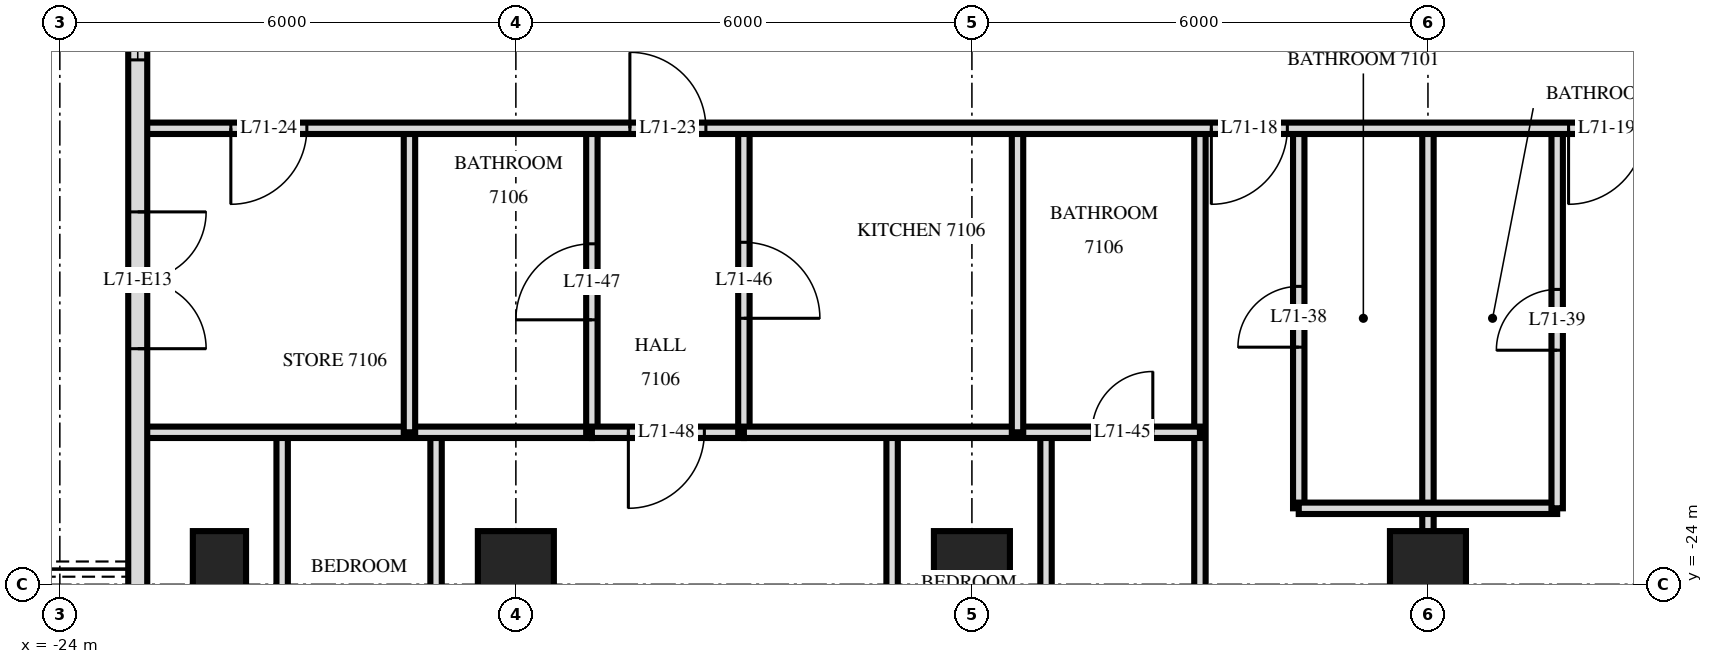
"""IFC4 building model, lengths in metres.
Left out: names, types, materials, properties, quantities, classifications, styles, units other than length and angle.
Written with IfcOpenShell. Run it as: python <this file> out.ifc"""

import sys

from ifc_helpers import new_model, si_unit, direction, frame, frame_2d, origin, origin_2d, place, context, subcontext, project, spatial, rectangle, extrude, element, fill, save


model = new_model("IFC4")
c1 = context("Model", 3, precision=1e-05, world=origin(), true_north=direction((0.0, 1.0)))
c2 = subcontext(c1, "Body", "Model", "MODEL_VIEW")
j1 = project(units=[si_unit("LENGTHUNIT", "METRE"), si_unit("PLANEANGLEUNIT", "RADIAN")], contexts=[c1])
p1 = place(None, origin())
s1 = spatial("IfcSite", under=j1, at=p1, CompositionType="ELEMENT")
p2 = place(p1, origin())
s2 = spatial("IfcBuilding", under=s1, at=p2, CompositionType="ELEMENT")
p3 = place(p2, frame((0.0, 0.0, 270.1)))
s3 = spatial("IfcBuildingStorey", under=s2, at=p3, CompositionType="ELEMENT", Elevation=270.1)
p4 = place(p3, frame((-21.9, -23.8, 0.0), z_axis=(0.0, 0.0, 1.0), x_axis=(0.0, 1.0, 0.0)))
e1 = element("IfcColumn", 1, at=p4, inside=s3, PredefinedType="COLUMN", context=c2, shape_type="SweptSolid", body=[
    extrude(rectangle(XDim=1.0, YDim=0.7, at=origin_2d()), origin(), (0.0, 0.0, 1.0), 3.5),
])
for number, where, z_axis, x_axis in (
    (2, (-18.0, -23.8, 0.0), (0.0, 0.0, 1.0), (1.0, 0.0, 0.0)),
    (3, (-12.0, -23.8, 0.0), (0.0, 0.0, 1.0), (1.0, 0.0, 0.0)),
    (4, (-6.0, -23.8, 0.0), (0.0, 0.0, 1.0), (1.0, 0.0, 0.0)),
):
    element("IfcColumn", number, at=place(p3, frame(where, z_axis=z_axis, x_axis=x_axis)), inside=s3, PredefinedType="COLUMN", context=c2, shape_type="SweptSolid", body=[
        extrude(rectangle(XDim=1.0, YDim=1.0, at=origin_2d()), origin(), (0.0, 0.0, 1.0), 3.5),
    ])
p5 = place(p3, frame((-22.975, -3.325, 0.0), z_axis=(0.0, 0.0, 1.0), x_axis=(0.0, -1.0, 0.0)))
e5 = element("IfcWall", 5, at=p5, inside=s3, PredefinedType="SOLIDWALL", context=c2, shape_type="SweptSolid", body=[
    extrude(rectangle(XDim=25.951, YDim=0.25, at=frame_2d((12.975, 0.0))), origin(), (0.0, 0.0, 1.0), 3.22),
])
p6 = place(p5, frame((1.925, 0.0, 0.0)))
e6 = element("IfcOpeningElement", 6, at=p6, cuts=e5, PredefinedType="OPENING", context=c2, shape_type="SweptSolid", body=[
    extrude(rectangle(XDim=1.8, YDim=2.4, at=frame_2d((0.9, 1.2))), frame((0.0, 0.135, 0.0), z_axis=(0.0, -1.0, 0.0), x_axis=(1.0, 0.0, 0.0)), (0.0, 0.0, 1.0), 0.27),
])
p7 = place(p5, frame((7.975, 0.0, 0.0)))
e7 = element("IfcOpeningElement", 7, at=p7, cuts=e5, PredefinedType="OPENING", context=c2, shape_type="SweptSolid", body=[
    extrude(rectangle(XDim=1.8, YDim=2.4, at=frame_2d((0.9, 1.2))), frame((0.0, 0.135, 0.0), z_axis=(0.0, -1.0, 0.0), x_axis=(1.0, 0.0, 0.0)), (0.0, 0.0, 1.0), 0.27),
])
p8 = place(p5, frame((12.575, 0.0, 0.9)))
e8 = element("IfcOpeningElement", 8, at=p8, cuts=e5, PredefinedType="OPENING", context=c2, shape_type="SweptSolid", body=[
    extrude(rectangle(XDim=1.2, YDim=1.5, at=frame_2d((0.6, 0.75))), frame((0.0, 0.135, 0.0), z_axis=(0.0, -1.0, 0.0), x_axis=(1.0, 0.0, 0.0)), (0.0, 0.0, 1.0), 0.27),
])
p9 = place(p5, frame((15.775, 0.0, 0.0)))
e9 = element("IfcOpeningElement", 9, at=p9, cuts=e5, PredefinedType="OPENING", context=c2, shape_type="SweptSolid", body=[
    extrude(rectangle(XDim=1.8, YDim=2.4, at=frame_2d((0.9, 1.2))), frame((0.0, 0.135, 0.0), z_axis=(0.0, -1.0, 0.0), x_axis=(1.0, 0.0, 0.0)), (0.0, 0.0, 1.0), 0.27),
])
p10 = place(p5, frame((21.075, 0.0, 0.0)))
e10 = element("IfcOpeningElement", 10, at=p10, cuts=e5, PredefinedType="OPENING", context=c2, shape_type="SweptSolid", body=[
    extrude(rectangle(XDim=1.8, YDim=2.4, at=frame_2d((0.9, 1.2))), frame((0.0, 0.135, 0.0), z_axis=(0.0, -1.0, 0.0), x_axis=(1.0, 0.0, 0.0)), (0.0, 0.0, 1.0), 0.27),
])
p11 = place(p5, frame((23.825, 0.0, 0.9)))
e11 = element("IfcOpeningElement", 11, at=p11, cuts=e5, PredefinedType="OPENING", context=c2, shape_type="SweptSolid", body=[
    extrude(rectangle(XDim=1.8, YDim=1.5, at=frame_2d((0.9, 0.75))), frame((0.0, 0.135, 0.0), z_axis=(0.0, -1.0, 0.0), x_axis=(1.0, 0.0, 0.0)), (0.0, 0.0, 1.0), 0.27),
])
p12 = place(p3, frame((-4.3, -23.0, 0.0), z_axis=(0.0, 0.0, 1.0), x_axis=(0.0, 1.0, 0.0)))
e12 = element("IfcWall", 12, at=p12, inside=s3, PredefinedType="PARTITIONING", context=c2, shape_type="SweptSolid", body=[
    extrude(rectangle(XDim=5.0, YDim=0.15, at=frame_2d((2.5, 0.0))), origin(), (0.0, 0.0, 1.0), 3.22),
])
p13 = place(p12, frame((2.08, 0.0, 0.0)))
e13 = element("IfcOpeningElement", 13, at=p13, cuts=e12, PredefinedType="OPENING", context=c2, shape_type="SweptSolid", body=[
    extrude(rectangle(XDim=0.8, YDim=2.1, at=frame_2d((0.4, 1.05))), frame((0.0, 0.085, 0.0), z_axis=(0.0, -1.0, 0.0), x_axis=(1.0, 0.0, 0.0)), (0.0, 0.0, 1.0), 0.17),
])
p14 = place(p3, frame((-6.0, -33.62, 0.0), z_axis=(0.0, 0.0, 1.0), x_axis=(0.0, 1.0, 0.0)))
e14 = element("IfcWall", 14, at=p14, inside=s3, PredefinedType="PARTITIONING", context=c2, shape_type="SweptSolid", body=[
    extrude(rectangle(XDim=15.62, YDim=0.15, at=frame_2d((7.81, 0.0))), origin(), (0.0, 0.0, 1.0), 3.22),
])
p15 = place(p3, frame((-7.7, -23.0, 0.0), z_axis=(0.0, 0.0, 1.0), x_axis=(0.0, 1.0, 0.0)))
e15 = element("IfcWall", 15, at=p15, inside=s3, PredefinedType="PARTITIONING", context=c2, shape_type="SweptSolid", body=[
    extrude(rectangle(XDim=5.0, YDim=0.15, at=frame_2d((2.5, 0.0))), origin(), (0.0, 0.0, 1.0), 3.22),
])
p16 = place(p15, frame((2.12, 0.0, 0.0)))
e16 = element("IfcOpeningElement", 16, at=p16, cuts=e15, PredefinedType="OPENING", context=c2, shape_type="SweptSolid", body=[
    extrude(rectangle(XDim=0.8, YDim=2.1, at=frame_2d((0.4, 1.05))), frame((0.0, 0.085, 0.0), z_axis=(0.0, -1.0, 0.0), x_axis=(1.0, 0.0, 0.0)), (0.0, 0.0, 1.0), 0.17),
])
p17 = place(p3, frame((-9.0, -33.62, 0.0), z_axis=(0.0, 0.0, 1.0), x_axis=(0.0, 1.0, 0.0)))
e17 = element("IfcWall", 17, at=p17, inside=s3, PredefinedType="PARTITIONING", context=c2, shape_type="SweptSolid", body=[
    extrude(rectangle(XDim=15.62, YDim=0.15, at=frame_2d((7.81, 0.0))), origin(), (0.0, 0.0, 1.0), 3.22),
])
p18 = place(p3, frame((-11.025, -33.62, 0.0), z_axis=(0.0, 0.0, 1.0), x_axis=(0.0, 1.0, 0.0)))
e18 = element("IfcWall", 18, at=p18, inside=s3, PredefinedType="PARTITIONING", context=c2, shape_type="SweptSolid", body=[
    extrude(rectangle(XDim=11.62, YDim=0.15, at=frame_2d((5.81, 0.0))), origin(), (0.0, 0.0, 1.0), 3.22),
])
p19 = place(p18, frame((5.25, 0.0, 0.0)))
e19 = element("IfcOpeningElement", 19, at=p19, cuts=e18, PredefinedType="OPENING", context=c2, shape_type="SweptSolid", body=[
    extrude(rectangle(XDim=0.9, YDim=2.1, at=frame_2d((0.45, 1.05))), frame((0.0, 0.085, 0.0), z_axis=(0.0, -1.0, 0.0), x_axis=(1.0, 0.0, 0.0)), (0.0, 0.0, 1.0), 0.17),
])
p20 = place(p3, frame((-11.4, -22.0, 0.0), z_axis=(0.0, 0.0, 1.0), x_axis=(0.0, 1.0, 0.0)))
e20 = element("IfcWall", 20, at=p20, inside=s3, PredefinedType="PARTITIONING", context=c2, shape_type="SweptSolid", body=[
    extrude(rectangle(XDim=4.0, YDim=0.15, at=frame_2d((2.0, 0.0))), origin(), (0.0, 0.0, 1.0), 3.22),
])
p21 = place(p3, frame((-13.05, -33.62, 0.0), z_axis=(0.0, 0.0, 1.0), x_axis=(0.0, 1.0, 0.0)))
e21 = element("IfcWall", 21, at=p21, inside=s3, PredefinedType="PARTITIONING", context=c2, shape_type="SweptSolid", body=[
    extrude(rectangle(XDim=11.62, YDim=0.15, at=frame_2d((5.81, 0.0))), origin(), (0.0, 0.0, 1.0), 3.22),
])
p22 = place(p21, frame((5.25, 0.0, 0.0)))
e22 = element("IfcOpeningElement", 22, at=p22, cuts=e21, PredefinedType="OPENING", context=c2, shape_type="SweptSolid", body=[
    extrude(rectangle(XDim=0.9, YDim=2.1, at=frame_2d((0.45, 1.05))), frame((0.0, 0.085, 0.0), z_axis=(0.0, -1.0, 0.0), x_axis=(1.0, 0.0, 0.0)), (0.0, 0.0, 1.0), 0.17),
])
p23 = place(p3, frame((-15.0, -22.0, 0.0), z_axis=(0.0, 0.0, 1.0), x_axis=(0.0, 1.0, 0.0)))
e23 = element("IfcWall", 23, at=p23, inside=s3, PredefinedType="PARTITIONING", context=c2, shape_type="SweptSolid", body=[
    extrude(rectangle(XDim=4.0, YDim=0.15, at=frame_2d((2.0, 0.0))), origin(), (0.0, 0.0, 1.0), 3.22),
])
p24 = place(p23, frame((1.5, 0.0, 0.0)))
e24 = element("IfcOpeningElement", 24, at=p24, cuts=e23, PredefinedType="OPENING", context=c2, shape_type="SweptSolid", body=[
    extrude(rectangle(XDim=1.0, YDim=2.1, at=frame_2d((0.5, 1.05))), frame((0.0, 0.085, 0.0), z_axis=(0.0, -1.0, 0.0), x_axis=(1.0, 0.0, 0.0)), (0.0, 0.0, 1.0), 0.17),
])
p25 = place(p3, frame((-17.0, -22.0, 0.0), z_axis=(0.0, 0.0, 1.0), x_axis=(0.0, 1.0, 0.0)))
e25 = element("IfcWall", 25, at=p25, inside=s3, PredefinedType="PARTITIONING", context=c2, shape_type="SweptSolid", body=[
    extrude(rectangle(XDim=4.0, YDim=0.15, at=frame_2d((2.0, 0.0))), origin(), (0.0, 0.0, 1.0), 3.22),
])
p26 = place(p25, frame((1.48, 0.0, 0.0)))
e26 = element("IfcOpeningElement", 26, at=p26, cuts=e25, PredefinedType="OPENING", context=c2, shape_type="SweptSolid", body=[
    extrude(rectangle(XDim=1.0, YDim=2.1, at=frame_2d((0.5, 1.05))), frame((0.0, 0.085, 0.0), z_axis=(0.0, -1.0, 0.0), x_axis=(1.0, 0.0, 0.0)), (0.0, 0.0, 1.0), 0.17),
])
p27 = place(p3, frame((-19.05, -33.527, 0.0), z_axis=(0.0, 0.0, 1.0), x_axis=(0.0, 1.0, 0.0)))
e27 = element("IfcWall", 27, at=p27, inside=s3, PredefinedType="PARTITIONING", context=c2, shape_type="SweptSolid", body=[
    extrude(rectangle(XDim=11.527, YDim=0.15, at=frame_2d((5.764, 0.0))), origin(), (0.0, 0.0, 1.0), 3.22),
])
p28 = place(p27, frame((5.236, 0.0, 0.0)))
e28 = element("IfcOpeningElement", 28, at=p28, cuts=e27, PredefinedType="OPENING", context=c2, shape_type="SweptSolid", body=[
    extrude(rectangle(XDim=0.9, YDim=2.1, at=frame_2d((0.45, 1.05))), frame((0.0, 0.085, 0.0), z_axis=(0.0, -1.0, 0.0), x_axis=(1.0, 0.0, 0.0)), (0.0, 0.0, 1.0), 0.17),
])
p29 = place(p3, frame((-19.4, -22.0, 0.0), z_axis=(0.0, 0.0, 1.0), x_axis=(0.0, 1.0, 0.0)))
e29 = element("IfcWall", 29, at=p29, inside=s3, PredefinedType="PARTITIONING", context=c2, shape_type="SweptSolid", body=[
    extrude(rectangle(XDim=4.0, YDim=0.15, at=frame_2d((2.0, 0.0))), origin(), (0.0, 0.0, 1.0), 3.22),
])
p30 = place(p3, frame((-21.075, -32.666, 0.0), z_axis=(0.0, 0.0, 1.0), x_axis=(0.0, 1.0, 0.0)))
e30 = element("IfcWall", 30, at=p30, inside=s3, PredefinedType="PARTITIONING", context=c2, shape_type="SweptSolid", body=[
    extrude(rectangle(XDim=10.666, YDim=0.15, at=frame_2d((5.333, 0.0))), origin(), (0.0, 0.0, 1.0), 3.22),
])
p31 = place(p30, frame((4.732, 0.0, 0.0)))
e31 = element("IfcOpeningElement", 31, at=p31, cuts=e30, PredefinedType="OPENING", context=c2, shape_type="SweptSolid", body=[
    extrude(rectangle(XDim=0.9, YDim=2.1, at=frame_2d((0.45, 1.05))), frame((0.0, 0.085, 0.0), z_axis=(0.0, -1.0, 0.0), x_axis=(1.0, 0.0, 0.0)), (0.0, 0.0, 1.0), 0.17),
])
p32 = place(p3, frame((-7.7, -23.0, 0.0), z_axis=(0.0, 0.0, 1.0), x_axis=(1.0, 0.0, 0.0)))
e32 = element("IfcWall", 32, at=p32, inside=s3, PredefinedType="PARTITIONING", context=c2, shape_type="SweptSolid", body=[
    extrude(rectangle(XDim=3.4, YDim=0.15, at=frame_2d((1.7, 0.0))), origin(), (0.0, 0.0, 1.0), 3.22),
])
p33 = place(p3, frame((-17.0, -22.0, 0.0), z_axis=(0.0, 0.0, 1.0), x_axis=(1.0, 0.0, 0.0)))
e33 = element("IfcWall", 33, at=p33, inside=s3, PredefinedType="PARTITIONING", context=c2, shape_type="SweptSolid", body=[
    extrude(rectangle(XDim=2.0, YDim=0.15, at=frame_2d((1.0, 0.0))), origin(), (0.0, 0.0, 1.0), 3.22),
])
p34 = place(p33, frame((0.48, 0.0, 0.0)))
e34 = element("IfcOpeningElement", 34, at=p34, cuts=e33, PredefinedType="OPENING", context=c2, shape_type="SweptSolid", body=[
    extrude(rectangle(XDim=1.0, YDim=2.1, at=frame_2d((0.5, 1.05))), frame((0.0, 0.085, 0.0), z_axis=(0.0, -1.0, 0.0), x_axis=(1.0, 0.0, 0.0)), (0.0, 0.0, 1.0), 0.17),
])
p35 = place(p3, frame((-22.92, -22.0, 0.0), z_axis=(0.0, 0.0, 1.0), x_axis=(1.0, 0.0, 0.0)))
e35 = element("IfcWall", 35, at=p35, inside=s3, PredefinedType="PARTITIONING", context=c2, shape_type="SweptSolid", body=[
    extrude(rectangle(XDim=5.92, YDim=0.15, at=frame_2d((2.96, 0.0))), origin(), (0.0, 0.0, 1.0), 3.22),
])
p36 = place(p3, frame((-15.0, -22.0, 0.0), z_axis=(0.0, 0.0, 1.0), x_axis=(1.0, 0.0, 0.0)))
e36 = element("IfcWall", 36, at=p36, inside=s3, PredefinedType="PARTITIONING", context=c2, shape_type="SweptSolid", body=[
    extrude(rectangle(XDim=6.0, YDim=0.15, at=frame_2d((3.0, 0.0))), origin(), (0.0, 0.0, 1.0), 3.22),
])
p37 = place(p36, frame((4.58, 0.0, 0.0)))
e37 = element("IfcOpeningElement", 37, at=p37, cuts=e36, PredefinedType="OPENING", context=c2, shape_type="SweptSolid", body=[
    extrude(rectangle(XDim=0.8, YDim=2.1, at=frame_2d((0.4, 1.05))), frame((0.0, 0.085, 0.0), z_axis=(0.0, -1.0, 0.0), x_axis=(1.0, 0.0, 0.0)), (0.0, 0.0, 1.0), 0.17),
])
p38 = place(p3, frame((-22.92, -18.0, 0.0), z_axis=(0.0, 0.0, 1.0), x_axis=(1.0, 0.0, 0.0)))
e38 = element("IfcWall", 38, at=p38, inside=s3, PredefinedType="PARTITIONING", context=c2, shape_type="SweptSolid", body=[
    extrude(rectangle(XDim=45.84, YDim=0.15, at=frame_2d((22.92, 0.0))), origin(), (0.0, 0.0, 1.0), 3.22),
])
p39 = place(p38, frame((14.07, 0.0, 0.0)))
e39 = element("IfcOpeningElement", 39, at=p39, cuts=e38, PredefinedType="OPENING", context=c2, shape_type="SweptSolid", body=[
    extrude(rectangle(XDim=1.0, YDim=2.1, at=frame_2d((0.5, 1.05))), frame((0.0, 0.085, 0.0), z_axis=(0.0, -1.0, 0.0), x_axis=(1.0, 0.0, 0.0)), (0.0, 0.0, 1.0), 0.17),
])
p40 = place(p38, frame((18.77, 0.0, 0.0)))
e40 = element("IfcOpeningElement", 40, at=p40, cuts=e38, PredefinedType="OPENING", context=c2, shape_type="SweptSolid", body=[
    extrude(rectangle(XDim=1.0, YDim=2.1, at=frame_2d((0.5, 1.05))), frame((0.0, 0.085, 0.0), z_axis=(0.0, -1.0, 0.0), x_axis=(1.0, 0.0, 0.0)), (0.0, 0.0, 1.0), 0.17),
])
p41 = place(p38, frame((20.07, 0.0, 0.0)))
e41 = element("IfcOpeningElement", 41, at=p41, cuts=e38, PredefinedType="OPENING", context=c2, shape_type="SweptSolid", body=[
    extrude(rectangle(XDim=1.0, YDim=2.1, at=frame_2d((0.5, 1.05))), frame((0.0, 0.085, 0.0), z_axis=(0.0, -1.0, 0.0), x_axis=(1.0, 0.0, 0.0)), (0.0, 0.0, 1.0), 0.17),
])
p42 = place(p38, frame((25.57, 0.0, 0.0)))
e42 = element("IfcOpeningElement", 42, at=p42, cuts=e38, PredefinedType="OPENING", context=c2, shape_type="SweptSolid", body=[
    extrude(rectangle(XDim=1.0, YDim=2.1, at=frame_2d((0.5, 1.05))), frame((0.0, 0.085, 0.0), z_axis=(0.0, -1.0, 0.0), x_axis=(1.0, 0.0, 0.0)), (0.0, 0.0, 1.0), 0.17),
])
p43 = place(p38, frame((29.07, 0.0, 0.0)))
e43 = element("IfcOpeningElement", 43, at=p43, cuts=e38, PredefinedType="OPENING", context=c2, shape_type="SweptSolid", body=[
    extrude(rectangle(XDim=1.0, YDim=2.1, at=frame_2d((0.5, 1.05))), frame((0.0, 0.085, 0.0), z_axis=(0.0, -1.0, 0.0), x_axis=(1.0, 0.0, 0.0)), (0.0, 0.0, 1.0), 0.17),
])
p44 = place(p38, frame((6.42, 0.0, 0.0)))
e44 = element("IfcOpeningElement", 44, at=p44, cuts=e38, PredefinedType="OPENING", context=c2, shape_type="SweptSolid", body=[
    extrude(rectangle(XDim=1.0, YDim=2.1, at=frame_2d((0.5, 1.05))), frame((0.0, 0.085, 0.0), z_axis=(0.0, -1.0, 0.0), x_axis=(1.0, 0.0, 0.0)), (0.0, 0.0, 1.0), 0.17),
])
p45 = place(p38, frame((1.17, 0.0, 0.0)))
e45 = element("IfcOpeningElement", 45, at=p45, cuts=e38, PredefinedType="OPENING", context=c2, shape_type="SweptSolid", body=[
    extrude(rectangle(XDim=1.0, YDim=2.1, at=frame_2d((0.5, 1.05))), frame((0.0, 0.085, 0.0), z_axis=(0.0, -1.0, 0.0), x_axis=(1.0, 0.0, 0.0)), (0.0, 0.0, 1.0), 0.17),
])
p46 = place(p38, frame((38.42, 0.0, 0.0)))
e46 = element("IfcOpeningElement", 46, at=p46, cuts=e38, PredefinedType="OPENING", context=c2, shape_type="SweptSolid", body=[
    extrude(rectangle(XDim=1.0, YDim=2.1, at=frame_2d((0.5, 1.05))), frame((0.0, 0.085, 0.0), z_axis=(0.0, -1.0, 0.0), x_axis=(1.0, 0.0, 0.0)), (0.0, 0.0, 1.0), 0.17),
])
p47 = place(p38, frame((43.67, 0.0, 0.0)))
e47 = element("IfcOpeningElement", 47, at=p47, cuts=e38, PredefinedType="OPENING", context=c2, shape_type="SweptSolid", body=[
    extrude(rectangle(XDim=1.0, YDim=2.1, at=frame_2d((0.5, 1.05))), frame((0.0, 0.085, 0.0), z_axis=(0.0, -1.0, 0.0), x_axis=(1.0, 0.0, 0.0)), (0.0, 0.0, 1.0), 0.17),
])
p48 = place(p8, origin())
e48 = element("IfcWindow", 48, at=p48, inside=s3, PartitioningType="SINGLE_PANEL", PredefinedType="WINDOW", context=c2, shape_type="SweptSolid", body=[
    extrude(rectangle(XDim=1.2, YDim=1.5, at=frame_2d((0.6, 0.75))), frame((0.0, 0.03, 0.0), z_axis=(0.0, -1.0, 0.0), x_axis=(1.0, 0.0, 0.0)), (0.0, 0.0, 1.0), 0.06),
])
fill(e8, e48)
p49 = place(p9, origin())
e49 = element("IfcDoor", 49, at=p49, inside=s3, OperationType="DOUBLE_DOOR_SINGLE_SWING", PredefinedType="DOOR", context=c2, shape_type="SweptSolid", body=[
    extrude(rectangle(XDim=1.8, YDim=2.4, at=frame_2d((0.9, 1.2))), frame((0.0, 0.025, 0.0), z_axis=(0.0, -1.0, 0.0), x_axis=(1.0, 0.0, 0.0)), (0.0, 0.0, 1.0), 0.05),
])
fill(e9, e49)
p50 = place(p39, frame((0.5, 0.0, 0.0), z_axis=(0.0, 0.0, 1.0), x_axis=(-1.0, 0.0, 0.0)))
e50 = element("IfcDoor", 50, at=p50, inside=s3, OperationType="SINGLE_SWING_LEFT", PredefinedType="DOOR", context=c2, shape_type="SweptSolid", body=[
    extrude(rectangle(XDim=1.0, YDim=2.1, at=frame_2d((0.0, 1.05))), frame((0.0, -0.025, 0.0), z_axis=(0.0, 1.0, 0.0), x_axis=(-1.0, 0.0, 0.0)), (0.0, 0.0, 1.0), 0.05),
])
fill(e39, e50)
p51 = place(p40, frame((0.5, 0.0, 0.0), z_axis=(0.0, 0.0, 1.0), x_axis=(-1.0, 0.0, 0.0)))
e51 = element("IfcDoor", 51, at=p51, inside=s3, OperationType="SINGLE_SWING_LEFT", PredefinedType="DOOR", context=c2, shape_type="SweptSolid", body=[
    extrude(rectangle(XDim=1.0, YDim=2.1, at=frame_2d((0.0, 1.05))), frame((0.0, -0.025, 0.0), z_axis=(0.0, 1.0, 0.0), x_axis=(-1.0, 0.0, 0.0)), (0.0, 0.0, 1.0), 0.05),
])
fill(e40, e51)
p52 = place(p44, origin())
e52 = element("IfcDoor", 52, at=p52, inside=s3, OperationType="SINGLE_SWING_RIGHT", PredefinedType="DOOR", context=c2, shape_type="SweptSolid", body=[
    extrude(rectangle(XDim=1.0, YDim=2.1, at=frame_2d((0.5, 1.05))), frame((0.0, 0.025, 0.0), z_axis=(0.0, -1.0, 0.0), x_axis=(1.0, 0.0, 0.0)), (0.0, 0.0, 1.0), 0.05),
])
fill(e44, e52)
p53 = place(p45, frame((0.5, 0.0, 0.0), z_axis=(0.0, 0.0, 1.0), x_axis=(-1.0, 0.0, 0.0)))
e53 = element("IfcDoor", 53, at=p53, inside=s3, OperationType="SINGLE_SWING_LEFT", PredefinedType="DOOR", context=c2, shape_type="SweptSolid", body=[
    extrude(rectangle(XDim=1.0, YDim=2.1, at=frame_2d((0.0, 1.05))), frame((0.0, -0.025, 0.0), z_axis=(0.0, 1.0, 0.0), x_axis=(-1.0, 0.0, 0.0)), (0.0, 0.0, 1.0), 0.05),
])
fill(e45, e53)
p54 = place(p16, origin())
e54 = element("IfcDoor", 54, at=p54, inside=s3, OperationType="SINGLE_SWING_RIGHT", PredefinedType="DOOR", context=c2, shape_type="SweptSolid", body=[
    extrude(rectangle(XDim=0.8, YDim=2.1, at=frame_2d((0.4, 1.05))), frame((0.0, 0.025, 0.0), z_axis=(0.0, -1.0, 0.0), x_axis=(1.0, 0.0, 0.0)), (0.0, 0.0, 1.0), 0.05),
])
fill(e16, e54)
p55 = place(p13, origin())
e55 = element("IfcDoor", 55, at=p55, inside=s3, OperationType="SINGLE_SWING_RIGHT", PredefinedType="DOOR", context=c2, shape_type="SweptSolid", body=[
    extrude(rectangle(XDim=0.8, YDim=2.1, at=frame_2d((0.4, 1.05))), frame((0.0, 0.025, 0.0), z_axis=(0.0, -1.0, 0.0), x_axis=(1.0, 0.0, 0.0)), (0.0, 0.0, 1.0), 0.05),
])
fill(e13, e55)
p56 = place(p37, origin())
e56 = element("IfcDoor", 56, at=p56, inside=s3, OperationType="SINGLE_SWING_LEFT", PredefinedType="DOOR", context=c2, shape_type="SweptSolid", body=[
    extrude(rectangle(XDim=0.8, YDim=2.1, at=frame_2d((0.4, 1.05))), frame((0.0, 0.025, 0.0), z_axis=(0.0, -1.0, 0.0), x_axis=(1.0, 0.0, 0.0)), (0.0, 0.0, 1.0), 0.05),
])
fill(e37, e56)
p57 = place(p24, frame((0.5, 0.0, 0.0), z_axis=(0.0, 0.0, 1.0), x_axis=(-1.0, 0.0, 0.0)))
e57 = element("IfcDoor", 57, at=p57, inside=s3, OperationType="SINGLE_SWING_LEFT", PredefinedType="DOOR", context=c2, shape_type="SweptSolid", body=[
    extrude(rectangle(XDim=1.0, YDim=2.1, at=frame_2d((0.0, 1.05))), frame((0.0, -0.025, 0.0), z_axis=(0.0, 1.0, 0.0), x_axis=(-1.0, 0.0, 0.0)), (0.0, 0.0, 1.0), 0.05),
])
fill(e24, e57)
p58 = place(p26, origin())
e58 = element("IfcDoor", 58, at=p58, inside=s3, OperationType="SINGLE_SWING_RIGHT", PredefinedType="DOOR", context=c2, shape_type="SweptSolid", body=[
    extrude(rectangle(XDim=1.0, YDim=2.1, at=frame_2d((0.5, 1.05))), frame((0.0, 0.025, 0.0), z_axis=(0.0, -1.0, 0.0), x_axis=(1.0, 0.0, 0.0)), (0.0, 0.0, 1.0), 0.05),
])
fill(e26, e58)
p59 = place(p34, frame((0.5, 0.0, 0.0), z_axis=(0.0, 0.0, 1.0), x_axis=(-1.0, 0.0, 0.0)))
e59 = element("IfcDoor", 59, at=p59, inside=s3, OperationType="SINGLE_SWING_LEFT", PredefinedType="DOOR", context=c2, shape_type="SweptSolid", body=[
    extrude(rectangle(XDim=1.0, YDim=2.1, at=frame_2d((0.0, 1.05))), frame((0.0, -0.025, 0.0), z_axis=(0.0, 1.0, 0.0), x_axis=(-1.0, 0.0, 0.0)), (0.0, 0.0, 1.0), 0.05),
])
fill(e34, e59)
save(model, sys.argv[1])
